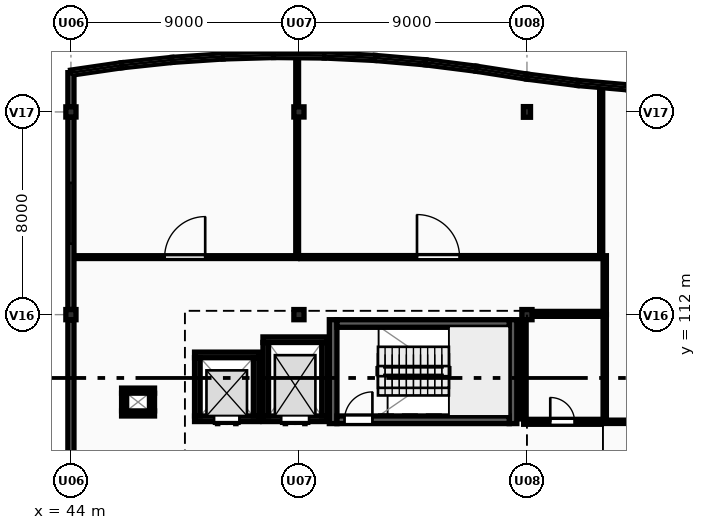
"""IFC4 building model, lengths in metres.
Left out: names, types, materials, properties, quantities, classifications, styles, units other than length and angle.
Written with IfcOpenShell. Run it as: python <this file> out.ifc"""

import sys

from ifc_helpers import new_model, si_unit, direction, frame, frame_2d, origin, origin_2d, place, context, subcontext, project, spatial, rectangle, extrude, element, fill, save


model = new_model("IFC4")
c1 = context("Model", 3, precision=1e-05, world=origin(), true_north=direction((0.0, 1.0)))
c2 = subcontext(c1, "Body", "Model", "MODEL_VIEW")
j1 = project(units=[si_unit("LENGTHUNIT", "METRE"), si_unit("PLANEANGLEUNIT", "RADIAN")], contexts=[c1])
p1 = place(None, origin())
s1 = spatial("IfcSite", under=j1, at=p1, CompositionType="ELEMENT")
p2 = place(p1, origin())
s2 = spatial("IfcBuilding", under=s1, at=p2, CompositionType="ELEMENT")
p3 = place(p2, frame((0.0, 0.0, 12.3)))
s3 = spatial("IfcBuildingStorey", under=s2, at=p3, CompositionType="ELEMENT", Elevation=12.3)
for number, where, z_axis, x_axis in (
    (1, (44.0, 112.0, 0.0), (0.0, 0.0, 1.0), (1.0, 0.0, 0.0)),
    (2, (44.0, 120.0, 0.0), (0.0, 0.0, 1.0), (1.0, 0.0, 0.0)),
    (3, (53.0, 112.0, 0.0), (0.0, 0.0, 1.0), (1.0, 0.0, 0.0)),
    (4, (53.0, 120.0, 0.0), (0.0, 0.0, 1.0), (1.0, 0.0, 0.0)),
    (5, (62.0, 112.0, 0.0), (0.0, 0.0, 1.0), (1.0, 0.0, 0.0)),
):
    element("IfcColumn", number, at=place(p3, frame(where, z_axis=z_axis, x_axis=x_axis)), inside=s3, PredefinedType="COLUMN", context=c2, shape_type="SweptSolid", body=[
        extrude(rectangle(XDim=0.4, YDim=0.4, at=origin_2d()), origin(), (0.0, 0.0, 1.0), 3.9),
    ])
p4 = place(p3, frame((62.0, 120.0, 0.0), z_axis=(0.0, 0.0, 1.0), x_axis=(1.0, 0.0, 0.0)))
e6 = element("IfcColumn", 6, at=p4, inside=s3, PredefinedType="PILASTER", context=c2, shape_type="SweptSolid", body=[
    extrude(rectangle(XDim=0.28, YDim=0.42, at=origin_2d()), origin(), (0.0, 0.0, 1.0), 3.9),
])
p5 = place(p3, frame((44.0, 121.55, 0.0), z_axis=(0.0, 0.0, 1.0), x_axis=(0.989544477223, 0.144228040259, 0.0)))
e7 = element("IfcWall", 7, at=p5, inside=s3, PredefinedType="SOLIDWALL", context=c2, shape_type="SweptSolid", body=[
    extrude(rectangle(XDim=2.021, YDim=0.2, at=frame_2d((1.011, 0.0))), origin(), (0.0, 0.0, 1.0), 0.95),
])
p6 = place(p3, frame((46.0, 121.842, 0.0), z_axis=(0.0, 0.0, 1.0), x_axis=(0.994395160059, 0.105727317433, 0.0)))
e8 = element("IfcWall", 8, at=p6, inside=s3, PredefinedType="SOLIDWALL", context=c2, shape_type="SweptSolid", body=[
    extrude(rectangle(XDim=2.011, YDim=0.2, at=frame_2d((1.006, 0.0))), origin(), (0.0, 0.0, 1.0), 0.95),
])
p7 = place(p3, frame((48.0, 122.054, 0.0), z_axis=(0.0, 0.0, 1.0), x_axis=(0.997729302978, 0.067351599676, 0.0)))
e9 = element("IfcWall", 9, at=p7, inside=s3, PredefinedType="SOLIDWALL", context=c2, shape_type="SweptSolid", body=[
    extrude(rectangle(XDim=2.005, YDim=0.2, at=frame_2d((1.002, 0.0))), origin(), (0.0, 0.0, 1.0), 0.95),
])
p8 = place(p3, frame((50.0, 122.189, 0.0), z_axis=(0.0, 0.0, 1.0), x_axis=(0.999581770858, 0.028918564416, 0.0)))
e10 = element("IfcWall", 10, at=p8, inside=s3, PredefinedType="SOLIDWALL", context=c2, shape_type="SweptSolid", body=[
    extrude(rectangle(XDim=2.001, YDim=0.2, at=frame_2d((1.0, 0.0))), origin(), (0.0, 0.0, 1.0), 0.95),
])
p9 = place(p3, frame((52.0, 122.247, 0.0), z_axis=(0.0, 0.0, 1.0), x_axis=(0.999953504169, -0.009643106302, 0.0)))
e11 = element("IfcWall", 11, at=p9, inside=s3, PredefinedType="SOLIDWALL", context=c2, shape_type="SweptSolid", body=[
    extrude(rectangle(XDim=2.0, YDim=0.2, at=frame_2d((1.0, 0.0))), origin(), (0.0, 0.0, 1.0), 0.95),
])
p10 = place(p3, frame((54.0, 122.228, 0.0), z_axis=(0.0, 0.0, 1.0), x_axis=(0.99884540439, -0.048040172037, 0.0)))
e12 = element("IfcWall", 12, at=p10, inside=s3, PredefinedType="SOLIDWALL", context=c2, shape_type="SweptSolid", body=[
    extrude(rectangle(XDim=2.002, YDim=0.2, at=frame_2d((1.001, 0.0))), origin(), (0.0, 0.0, 1.0), 0.95),
])
p11 = place(p3, frame((56.0, 122.132, 0.0), z_axis=(0.0, 0.0, 1.0), x_axis=(0.996244237948, -0.086587633962, 0.0)))
e13 = element("IfcWall", 13, at=p11, inside=s3, PredefinedType="SOLIDWALL", context=c2, shape_type="SweptSolid", body=[
    extrude(rectangle(XDim=2.008, YDim=0.2, at=frame_2d((1.004, 0.0))), origin(), (0.0, 0.0, 1.0), 0.95),
])
p12 = place(p3, frame((58.0, 121.958, 0.0), z_axis=(0.0, 0.0, 1.0), x_axis=(0.992158168336, -0.124988675503, 0.0)))
e14 = element("IfcWall", 14, at=p12, inside=s3, PredefinedType="SOLIDWALL", context=c2, shape_type="SweptSolid", body=[
    extrude(rectangle(XDim=2.016, YDim=0.2, at=frame_2d((1.008, 0.0))), origin(), (0.0, 0.0, 1.0), 0.95),
])
p13 = place(p3, frame((60.0, 121.706, 0.0), z_axis=(0.0, 0.0, 1.0), x_axis=(0.988085509852, -0.153905897287, 0.0)))
e15 = element("IfcWall", 15, at=p13, inside=s3, PredefinedType="SOLIDWALL", context=c2, shape_type="SweptSolid", body=[
    extrude(rectangle(XDim=2.024, YDim=0.2, at=frame_2d((1.012, 0.0))), origin(), (0.0, 0.0, 1.0), 0.95),
])
p14 = place(p3, frame((62.0, 121.394, 0.0), z_axis=(0.0, 0.0, 1.0), x_axis=(0.992158168336, -0.124988675503, 0.0)))
e16 = element("IfcWall", 16, at=p14, inside=s3, PredefinedType="SOLIDWALL", context=c2, shape_type="SweptSolid", body=[
    extrude(rectangle(XDim=2.016, YDim=0.2, at=frame_2d((1.008, 0.0))), origin(), (0.0, 0.0, 1.0), 0.95),
])
p15 = place(p3, frame((64.0, 121.142, 0.0), z_axis=(0.0, 0.0, 1.0), x_axis=(0.996244237948, -0.086587633962, 0.0)))
e17 = element("IfcWall", 17, at=p15, inside=s3, PredefinedType="SOLIDWALL", context=c2, shape_type="SweptSolid", body=[
    extrude(rectangle(XDim=2.008, YDim=0.2, at=frame_2d((1.004, 0.0))), origin(), (0.0, 0.0, 1.0), 0.95),
])
p16 = place(p3, frame((44.0, 104.2, 0.0), z_axis=(0.0, 0.0, 1.0), x_axis=(0.0, 1.0, 0.0)))
e18 = element("IfcWall", 18, at=p16, inside=s3, PredefinedType="SOLIDWALL", context=c2, shape_type="SweptSolid", body=[
    extrude(rectangle(XDim=7.6, YDim=0.24, at=frame_2d((3.8, 0.0))), origin(), (0.0, 0.0, 1.0), 3.29),
])
p17 = place(p3, frame((44.0, 112.2, 0.0), z_axis=(0.0, 0.0, 1.0), x_axis=(0.0, 1.0, 0.0)))
e19 = element("IfcWall", 19, at=p17, inside=s3, PredefinedType="SOLIDWALL", context=c2, shape_type="SweptSolid", body=[
    extrude(rectangle(XDim=7.6, YDim=0.24, at=frame_2d((3.8, 0.0))), origin(), (0.0, 0.0, 1.0), 3.29),
])
p18 = place(p17, frame((2.6, 0.0, 0.95)))
e20 = element("IfcOpeningElement", 20, at=p18, cuts=e19, PredefinedType="OPENING", context=c2, shape_type="SweptSolid", body=[
    extrude(rectangle(XDim=2.4, YDim=1.5, at=frame_2d((1.2, 0.75))), frame((0.0, 0.13, 0.0), z_axis=(0.0, -1.0, 0.0), x_axis=(1.0, 0.0, 0.0)), (0.0, 0.0, 1.0), 0.26),
])
p19 = place(p3, frame((44.0, 120.2, 0.0), z_axis=(0.0, 0.0, 1.0), x_axis=(0.0, 1.0, 0.0)))
e21 = element("IfcWall", 21, at=p19, inside=s3, PredefinedType="SOLIDWALL", context=c2, shape_type="SweptSolid", body=[
    extrude(rectangle(XDim=1.35, YDim=0.24, at=frame_2d((0.675, 0.0))), origin(), (0.0, 0.0, 1.0), 3.29),
])
for number, where, z_axis, x_axis in (
    (22, (54.35, 107.7, 0.0), (0.0, 0.0, 1.0), (0.0, 1.0, 0.0)),
    (23, (61.45, 111.8, 0.0), (0.0, 0.0, 1.0), (0.0, -1.0, 0.0)),
):
    element("IfcWall", number, at=place(p3, frame(where, z_axis=z_axis, x_axis=x_axis)), inside=s3, PredefinedType="SHEAR", context=c2, shape_type="SweptSolid", body=[
        extrude(rectangle(XDim=4.1, YDim=0.3, at=frame_2d((2.05, 0.0))), origin(), (0.0, 0.0, 1.0), 3.65),
    ])
p20 = place(p3, frame((54.5, 107.85, 0.0), z_axis=(0.0, 0.0, 1.0), x_axis=(1.0, 0.0, 0.0)))
e24 = element("IfcWall", 24, at=p20, inside=s3, PredefinedType="SHEAR", context=c2, shape_type="SweptSolid", body=[
    extrude(rectangle(XDim=6.8, YDim=0.3, at=frame_2d((3.4, 0.0))), origin(), (0.0, 0.0, 1.0), 3.65),
])
p21 = place(p20, frame((0.3, 0.0, 0.0)))
e25 = element("IfcOpeningElement", 25, at=p21, cuts=e24, PredefinedType="OPENING", context=c2, shape_type="SweptSolid", body=[
    extrude(rectangle(XDim=1.1, YDim=2.15, at=frame_2d((0.55, 1.075))), frame((0.0, 0.16, 0.0), z_axis=(0.0, -1.0, 0.0), x_axis=(1.0, 0.0, 0.0)), (0.0, 0.0, 1.0), 0.32),
])
p22 = place(p3, frame((61.3, 111.65, 0.0), z_axis=(0.0, 0.0, 1.0), x_axis=(-1.0, 0.0, 0.0)))
e26 = element("IfcWall", 26, at=p22, inside=s3, PredefinedType="SHEAR", context=c2, shape_type="SweptSolid", body=[
    extrude(rectangle(XDim=6.8, YDim=0.3, at=frame_2d((3.4, 0.0))), origin(), (0.0, 0.0, 1.0), 3.65),
])
p23 = place(p3, frame((54.12, 107.89, 0.0), z_axis=(0.0, 0.0, 1.0), x_axis=(-1.0, 0.0, 0.0)))
e27 = element("IfcWall", 27, at=p23, inside=s3, PredefinedType="SHEAR", context=c2, shape_type="SweptSolid", body=[
    extrude(rectangle(XDim=2.54, YDim=0.22, at=frame_2d((1.27, 0.0))), origin(), (0.0, 0.0, 1.0), 3.65),
])
p24 = place(p23, frame((0.72, 0.0, 0.0)))
e28 = element("IfcOpeningElement", 28, at=p24, cuts=e27, PredefinedType="OPENING", context=c2, shape_type="SweptSolid", body=[
    extrude(rectangle(XDim=1.1, YDim=2.15, at=frame_2d((0.55, 1.075))), frame((0.0, 0.12, 0.0), z_axis=(0.0, -1.0, 0.0), x_axis=(1.0, 0.0, 0.0)), (0.0, 0.0, 1.0), 0.24),
])
p25 = place(p3, frame((51.58, 111.01, 0.0), z_axis=(0.0, 0.0, 1.0), x_axis=(1.0, 0.0, 0.0)))
e29 = element("IfcWall", 29, at=p25, inside=s3, PredefinedType="SHEAR", context=c2, shape_type="SweptSolid", body=[
    extrude(rectangle(XDim=2.54, YDim=0.22, at=frame_2d((1.27, 0.0))), origin(), (0.0, 0.0, 1.0), 3.65),
])
for number, where, z_axis, x_axis in (
    (30, (51.69, 108.0, 0.0), (0.0, 0.0, 1.0), (0.0, 1.0, 0.0)),
    (31, (54.01, 110.9, 0.0), (0.0, 0.0, 1.0), (0.0, -1.0, 0.0)),
):
    element("IfcWall", number, at=place(p3, frame(where, z_axis=z_axis, x_axis=x_axis)), inside=s3, PredefinedType="SHEAR", context=c2, shape_type="SweptSolid", body=[
        extrude(rectangle(XDim=2.9, YDim=0.22, at=frame_2d((1.45, 0.0))), origin(), (0.0, 0.0, 1.0), 3.65),
    ])
p26 = place(p3, frame((51.42, 107.89, 0.0), z_axis=(0.0, 0.0, 1.0), x_axis=(-1.0, 0.0, 0.0)))
e32 = element("IfcWall", 32, at=p26, inside=s3, PredefinedType="SHEAR", context=c2, shape_type="SweptSolid", body=[
    extrude(rectangle(XDim=2.54, YDim=0.22, at=frame_2d((1.27, 0.0))), origin(), (0.0, 0.0, 1.0), 3.65),
])
p27 = place(p26, frame((0.77, 0.0, 0.0)))
e33 = element("IfcOpeningElement", 33, at=p27, cuts=e32, PredefinedType="OPENING", context=c2, shape_type="SweptSolid", body=[
    extrude(rectangle(XDim=1.0, YDim=2.15, at=frame_2d((0.5, 1.075))), frame((0.0, 0.12, 0.0), z_axis=(0.0, -1.0, 0.0), x_axis=(1.0, 0.0, 0.0)), (0.0, 0.0, 1.0), 0.24),
])
p28 = place(p3, frame((48.88, 110.41, 0.0), z_axis=(0.0, 0.0, 1.0), x_axis=(1.0, 0.0, 0.0)))
e34 = element("IfcWall", 34, at=p28, inside=s3, PredefinedType="SHEAR", context=c2, shape_type="SweptSolid", body=[
    extrude(rectangle(XDim=2.54, YDim=0.22, at=frame_2d((1.27, 0.0))), origin(), (0.0, 0.0, 1.0), 3.65),
])
for number, where, z_axis, x_axis in (
    (35, (48.99, 108.0, 0.0), (0.0, 0.0, 1.0), (0.0, 1.0, 0.0)),
    (36, (51.31, 110.3, 0.0), (0.0, 0.0, 1.0), (0.0, -1.0, 0.0)),
):
    element("IfcWall", number, at=place(p3, frame(where, z_axis=z_axis, x_axis=x_axis)), inside=s3, PredefinedType="SHEAR", context=c2, shape_type="SweptSolid", body=[
        extrude(rectangle(XDim=2.3, YDim=0.22, at=frame_2d((1.15, 0.0))), origin(), (0.0, 0.0, 1.0), 3.65),
    ])
for number, where, z_axis, x_axis in (
    (37, (47.3, 108.1, 0.0), (0.0, 0.0, 1.0), (-1.0, 0.0, 0.0)),
    (38, (46.0, 109.0, 0.0), (0.0, 0.0, 1.0), (1.0, 0.0, 0.0)),
):
    element("IfcWall", number, at=place(p3, frame(where, z_axis=z_axis, x_axis=x_axis)), inside=s3, PredefinedType="PARTITIONING", context=c2, shape_type="SweptSolid", body=[
        extrude(rectangle(XDim=1.3, YDim=0.2, at=frame_2d((0.65, 0.0))), origin(), (0.0, 0.0, 1.0), 3.65),
    ])
p29 = place(p3, frame((46.1, 108.2, 0.0), z_axis=(0.0, 0.0, 1.0), x_axis=(0.0, 1.0, 0.0)))
e39 = element("IfcWall", 39, at=p29, inside=s3, PredefinedType="PARTITIONING", context=c2, shape_type="SweptSolid", body=[
    extrude(rectangle(XDim=0.7, YDim=0.2, at=frame_2d((0.35, 0.0))), origin(), (0.0, 0.0, 1.0), 3.65),
])
p30 = place(p3, frame((47.2, 108.9, 0.0), z_axis=(0.0, 0.0, 1.0), x_axis=(0.0, -1.0, 0.0)))
e40 = element("IfcWall", 40, at=p30, inside=s3, PredefinedType="PARTITIONING", context=c2, shape_type="SweptSolid", body=[
    extrude(rectangle(XDim=0.7, YDim=0.2, at=frame_2d((0.35, 0.0))), origin(), (0.0, 0.0, 1.0), 3.248),
])
p31 = place(p3, frame((44.162, 114.27, 0.0), z_axis=(0.0, 0.0, 1.0), x_axis=(1.0, 0.0, 0.0)))
e41 = element("IfcWall", 41, at=p31, inside=s3, PredefinedType="PARTITIONING", context=c2, shape_type="SweptSolid", body=[
    extrude(rectangle(XDim=8.768, YDim=0.11, at=frame_2d((4.384, 0.0))), origin(), (0.0, 0.0, 1.0), 3.65),
])
p32 = place(p31, frame((3.538, 0.0, 0.0)))
e42 = element("IfcOpeningElement", 42, at=p32, cuts=e41, PredefinedType="OPENING", context=c2, shape_type="SweptSolid", body=[
    extrude(rectangle(XDim=1.6, YDim=2.2, at=frame_2d((0.8, 1.1))), frame((0.0, 0.065, 0.0), z_axis=(0.0, -1.0, 0.0), x_axis=(1.0, 0.0, 0.0)), (0.0, 0.0, 1.0), 0.13),
])
p33 = place(p3, frame((52.93, 114.34, 0.0), z_axis=(0.0, 0.0, 1.0), x_axis=(0.0, 1.0, 0.0)))
e43 = element("IfcWall", 43, at=p33, inside=s3, PredefinedType="PARTITIONING", context=c2, shape_type="SweptSolid", body=[
    extrude(rectangle(XDim=7.756, YDim=0.11, at=frame_2d((3.878, 0.0))), origin(), (0.0, 0.0, 1.0), 3.09),
])
p34 = place(p3, frame((53.07, 114.27, 0.0), z_axis=(0.0, 0.0, 1.0), x_axis=(1.0, 0.0, 0.0)))
e44 = element("IfcWall", 44, at=p34, inside=s3, PredefinedType="PARTITIONING", context=c2, shape_type="SweptSolid", body=[
    extrude(rectangle(XDim=11.86, YDim=0.12, at=frame_2d((5.93, 0.0))), origin(), (0.0, 0.0, 1.0), 3.65),
])
p35 = place(p34, frame((4.59, 0.0, 0.0)))
e45 = element("IfcOpeningElement", 45, at=p35, cuts=e44, PredefinedType="OPENING", context=c2, shape_type="SweptSolid", body=[
    extrude(rectangle(XDim=1.68, YDim=2.2, at=frame_2d((0.84, 1.1))), frame((0.0, 0.07, 0.0), z_axis=(0.0, -1.0, 0.0), x_axis=(1.0, 0.0, 0.0)), (0.0, 0.0, 1.0), 0.14),
])
p36 = place(p3, frame((64.93, 114.345, 0.0), z_axis=(0.0, 0.0, 1.0), x_axis=(0.0, 1.0, 0.0)))
e46 = element("IfcWall", 46, at=p36, inside=s3, PredefinedType="PARTITIONING", context=c2, shape_type="SweptSolid", body=[
    extrude(rectangle(XDim=6.574, YDim=0.12, at=frame_2d((3.287, 0.0))), origin(), (0.0, 0.0, 1.0), 3.65),
])
p37 = place(p3, frame((65.07, 107.77, 0.0), z_axis=(0.0, 0.0, 1.0), x_axis=(1.0, 0.0, 0.0)))
e47 = element("IfcWall", 47, at=p37, inside=s3, PredefinedType="PARTITIONING", context=c2, shape_type="SweptSolid", body=[
    extrude(rectangle(XDim=11.36, YDim=0.13, at=frame_2d((5.68, 0.0))), origin(), (0.0, 0.0, 1.0), 3.65),
])
p38 = place(p37, frame((3.55, 0.0, 0.0)))
e48 = element("IfcOpeningElement", 48, at=p38, cuts=e47, PredefinedType="OPENING", context=c2, shape_type="SweptSolid", body=[
    extrude(rectangle(XDim=1.76, YDim=2.2, at=frame_2d((0.88, 1.1))), frame((0.0, 0.075, 0.0), z_axis=(0.0, -1.0, 0.0), x_axis=(1.0, 0.0, 0.0)), (0.0, 0.0, 1.0), 0.15),
])
p39 = place(p3, frame((65.07, 107.85, 0.0), z_axis=(0.0, 0.0, 1.0), x_axis=(0.0, 1.0, 0.0)))
e49 = element("IfcWall", 49, at=p39, inside=s3, PredefinedType="PARTITIONING", context=c2, shape_type="SweptSolid", body=[
    extrude(rectangle(XDim=4.15, YDim=0.13, at=frame_2d((2.075, 0.0))), origin(), (0.0, 0.0, 1.0), 3.65),
])
p40 = place(p3, frame((65.07, 112.0, 0.0), z_axis=(0.0, 0.0, 1.0), x_axis=(0.0, 1.0, 0.0)))
e50 = element("IfcWall", 50, at=p40, inside=s3, PredefinedType="PARTITIONING", context=c2, shape_type="SweptSolid", body=[
    extrude(rectangle(XDim=2.325, YDim=0.13, at=frame_2d((1.163, 0.0))), origin(), (0.0, 0.0, 1.0), 3.65),
])
p41 = place(p3, frame((61.87, 107.77, 0.0), z_axis=(0.0, 0.0, 1.0), x_axis=(1.0, 0.0, 0.0)))
e51 = element("IfcWall", 51, at=p41, inside=s3, PredefinedType="PARTITIONING", context=c2, shape_type="SweptSolid", body=[
    extrude(rectangle(XDim=3.06, YDim=0.195, at=frame_2d((1.53, 0.0))), origin(), (0.0, 0.0, 1.0), 3.65),
])
p42 = place(p41, frame((1.05, 0.0, 0.0)))
e52 = element("IfcOpeningElement", 52, at=p42, cuts=e51, PredefinedType="OPENING", context=c2, shape_type="SweptSolid", body=[
    extrude(rectangle(XDim=0.96, YDim=2.15, at=frame_2d((0.48, 1.075))), frame((0.0, 0.107, 0.0), z_axis=(0.0, -1.0, 0.0), x_axis=(1.0, 0.0, 0.0)), (0.0, 0.0, 1.0), 0.215),
])
p43 = place(p3, frame((62.215, 112.03, 0.0), z_axis=(0.0, 0.0, 1.0), x_axis=(1.0, 0.0, 0.0)))
e53 = element("IfcWall", 53, at=p43, inside=s3, PredefinedType="PARTITIONING", context=c2, shape_type="SweptSolid", body=[
    extrude(rectangle(XDim=2.715, YDim=0.195, at=frame_2d((1.357, 0.0))), origin(), (0.0, 0.0, 1.0), 3.65),
])
p44 = place(p3, frame((61.87, 107.883, 0.0), z_axis=(0.0, 0.0, 1.0), x_axis=(0.0, 1.0, 0.0)))
e54 = element("IfcWall", 54, at=p44, inside=s3, PredefinedType="PARTITIONING", context=c2, shape_type="SweptSolid", body=[
    extrude(rectangle(XDim=3.902, YDim=0.195, at=frame_2d((1.951, 0.0))), origin(), (0.0, 0.0, 1.0), 3.65),
])
p45 = place(p18, origin())
e55 = element("IfcWindow", 55, at=p45, inside=s3, PartitioningType="DOUBLE_PANEL_VERTICAL", PredefinedType="WINDOW", context=c2, shape_type="SweptSolid", body=[
    extrude(rectangle(XDim=2.4, YDim=1.5, at=frame_2d((1.2, 0.75))), frame((0.0, 0.03, 0.0), z_axis=(0.0, -1.0, 0.0), x_axis=(1.0, 0.0, 0.0)), (0.0, 0.0, 1.0), 0.06),
])
fill(e20, e55)
p46 = place(p21, origin())
e56 = element("IfcDoor", 56, at=p46, inside=s3, OperationType="SINGLE_SWING_RIGHT", PredefinedType="DOOR", context=c2, shape_type="SweptSolid", body=[
    extrude(rectangle(XDim=1.1, YDim=2.15, at=frame_2d((0.55, 1.075))), frame((0.0, 0.025, 0.0), z_axis=(0.0, -1.0, 0.0), x_axis=(1.0, 0.0, 0.0)), (0.0, 0.0, 1.0), 0.05),
])
fill(e25, e56)
p47 = place(p24, origin())
e57 = element("IfcDoor", 57, at=p47, inside=s3, OperationType="DOUBLE_DOOR_SLIDING", PredefinedType="DOOR", context=c2, shape_type="SweptSolid", body=[
    extrude(rectangle(XDim=1.1, YDim=2.15, at=frame_2d((0.55, 1.075))), frame((0.0, 0.025, 0.0), z_axis=(0.0, -1.0, 0.0), x_axis=(1.0, 0.0, 0.0)), (0.0, 0.0, 1.0), 0.05),
])
fill(e28, e57)
p48 = place(p27, origin())
e58 = element("IfcDoor", 58, at=p48, inside=s3, OperationType="DOUBLE_DOOR_SLIDING", PredefinedType="DOOR", context=c2, shape_type="SweptSolid", body=[
    extrude(rectangle(XDim=1.0, YDim=2.15, at=frame_2d((0.5, 1.075))), frame((0.0, 0.025, 0.0), z_axis=(0.0, -1.0, 0.0), x_axis=(1.0, 0.0, 0.0)), (0.0, 0.0, 1.0), 0.05),
])
fill(e33, e58)
p49 = place(p32, origin())
e59 = element("IfcDoor", 59, at=p49, inside=s3, OperationType="SINGLE_SWING_RIGHT", PredefinedType="DOOR", context=c2, shape_type="SweptSolid", body=[
    extrude(rectangle(XDim=1.6, YDim=2.2, at=frame_2d((0.8, 1.1))), frame((0.0, 0.025, 0.0), z_axis=(0.0, -1.0, 0.0), x_axis=(1.0, 0.0, 0.0)), (0.0, 0.0, 1.0), 0.05),
])
fill(e42, e59)
p50 = place(p35, origin())
e60 = element("IfcDoor", 60, at=p50, inside=s3, OperationType="SINGLE_SWING_LEFT", PredefinedType="DOOR", context=c2, shape_type="SweptSolid", body=[
    extrude(rectangle(XDim=1.68, YDim=2.2, at=frame_2d((0.84, 1.1))), frame((0.0, 0.025, 0.0), z_axis=(0.0, -1.0, 0.0), x_axis=(1.0, 0.0, 0.0)), (0.0, 0.0, 1.0), 0.05),
])
fill(e45, e60)
p51 = place(p42, origin())
e61 = element("IfcDoor", 61, at=p51, inside=s3, OperationType="SINGLE_SWING_LEFT", PredefinedType="DOOR", context=c2, shape_type="SweptSolid", body=[
    extrude(rectangle(XDim=0.96, YDim=2.15, at=frame_2d((0.48, 1.075))), frame((0.0, 0.025, 0.0), z_axis=(0.0, -1.0, 0.0), x_axis=(1.0, 0.0, 0.0)), (0.0, 0.0, 1.0), 0.05),
])
fill(e52, e61)
save(model, sys.argv[1])
